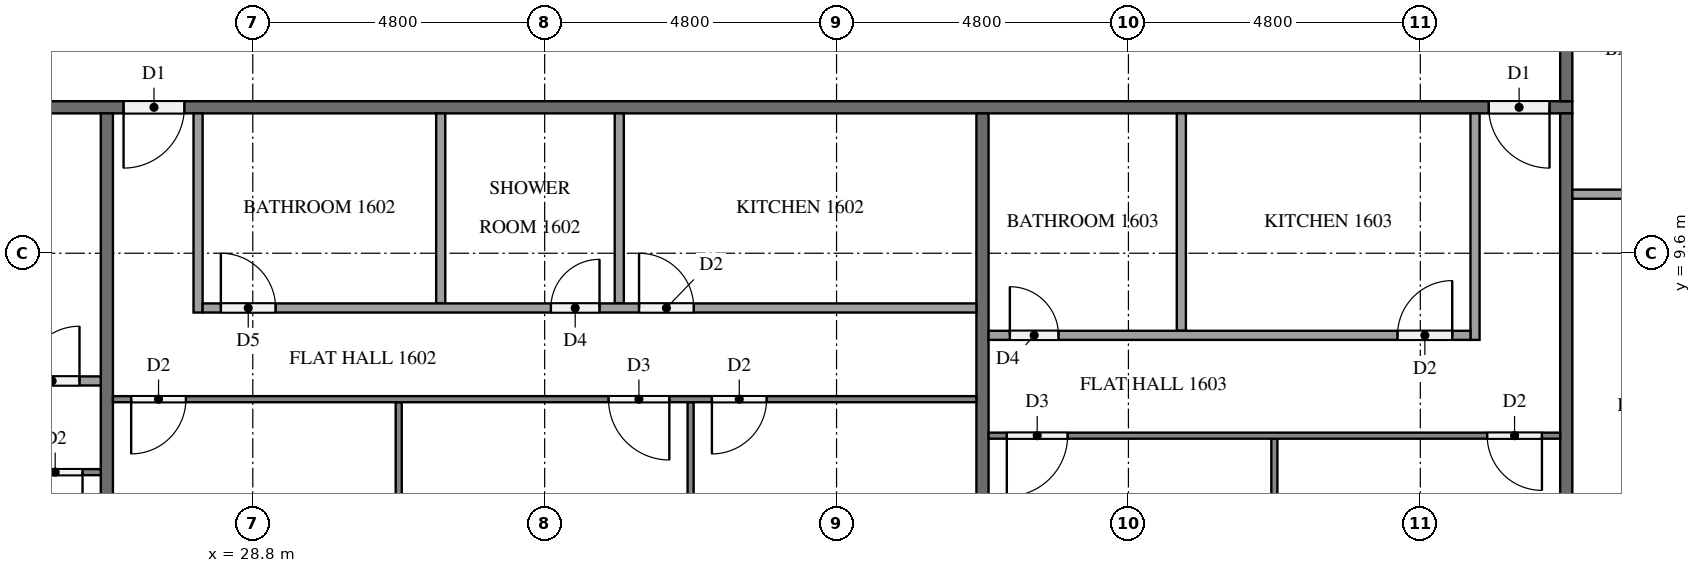
"""IFC4 building model, lengths in metres.
Left out: names, types, materials, properties, quantities, classifications, styles, units other than length and angle.
Written with IfcOpenShell. Run it as: python <this file> out.ifc"""

import sys

from ifc_helpers import new_model, si_unit, direction, frame, frame_2d, origin, place, context, subcontext, project, spatial, rectangle, extrude, element, fill, save


model = new_model("IFC4")
c1 = context("Model", 3, precision=1e-05, world=origin(), true_north=direction((0.0, 1.0)))
c2 = subcontext(c1, "Body", "Model", "MODEL_VIEW")
j1 = project(units=[si_unit("LENGTHUNIT", "METRE"), si_unit("PLANEANGLEUNIT", "RADIAN")], contexts=[c1])
p1 = place(None, origin())
s1 = spatial("IfcSite", under=j1, at=p1, CompositionType="ELEMENT")
p2 = place(p1, origin())
s2 = spatial("IfcBuilding", under=s1, at=p2, CompositionType="ELEMENT")
p3 = place(p2, frame((0.0, 0.0, 66.3)))
s3 = spatial("IfcBuildingStorey", under=s2, at=p3, CompositionType="ELEMENT", Elevation=66.3)
p4 = place(p3, frame((50.5, 12.0, 0.0), z_axis=(0.0, 0.0, 1.0), x_axis=(-1.0, 0.0, 0.0)))
e1 = element("IfcWall", 1, at=p4, inside=s3, PredefinedType="PARTITIONING", context=c2, shape_type="SweptSolid", body=[
    extrude(rectangle(XDim=38.6, YDim=0.2, at=frame_2d((19.3, 0.0))), origin(), (0.0, 0.0, 1.0), 3.2),
])
p5 = place(p4, frame((37.225, 0.0, 0.0)))
e2 = element("IfcOpeningElement", 2, at=p5, cuts=e1, PredefinedType="OPENING", context=c2, shape_type="SweptSolid", body=[
    extrude(rectangle(XDim=1.0, YDim=2.1, at=frame_2d((0.5, 1.05))), frame((0.0, 0.11, 0.0), z_axis=(0.0, -1.0, 0.0), x_axis=(1.0, 0.0, 0.0)), (0.0, 0.0, 1.0), 0.22),
])
p6 = place(p4, frame((22.825, 0.0, 0.0)))
e3 = element("IfcOpeningElement", 3, at=p6, cuts=e1, PredefinedType="OPENING", context=c2, shape_type="SweptSolid", body=[
    extrude(rectangle(XDim=1.0, YDim=2.1, at=frame_2d((0.5, 1.05))), frame((0.0, 0.11, 0.0), z_axis=(0.0, -1.0, 0.0), x_axis=(1.0, 0.0, 0.0)), (0.0, 0.0, 1.0), 0.22),
])
p7 = place(p4, frame((0.375, 0.0, 0.0)))
e4 = element("IfcOpeningElement", 4, at=p7, cuts=e1, PredefinedType="OPENING", context=c2, shape_type="SweptSolid", body=[
    extrude(rectangle(XDim=1.0, YDim=2.1, at=frame_2d((0.5, 1.05))), frame((0.0, 0.11, 0.0), z_axis=(0.0, -1.0, 0.0), x_axis=(1.0, 0.0, 0.0)), (0.0, 0.0, 1.0), 0.22),
])
p8 = place(p3, frame((50.4, 40.7, 0.0), z_axis=(0.0, 0.0, 1.0), x_axis=(0.0, -1.0, 0.0)))
e5 = element("IfcWall", 5, at=p8, inside=s3, PredefinedType="PARTITIONING", context=c2, shape_type="SweptSolid", body=[
    extrude(rectangle(XDim=28.6, YDim=0.2, at=frame_2d((14.3, 0.0))), origin(), (0.0, 0.0, 1.0), 3.2),
])
p9 = place(p8, frame((24.175, 0.0, 0.0)))
e6 = element("IfcOpeningElement", 6, at=p9, cuts=e5, PredefinedType="OPENING", context=c2, shape_type="SweptSolid", body=[
    extrude(rectangle(XDim=1.0, YDim=2.1, at=frame_2d((0.5, 1.05))), frame((0.0, 0.11, 0.0), z_axis=(0.0, -1.0, 0.0), x_axis=(1.0, 0.0, 0.0)), (0.0, 0.0, 1.0), 0.22),
])
p10 = place(p8, frame((22.625, 0.0, 0.0)))
e7 = element("IfcOpeningElement", 7, at=p10, cuts=e5, PredefinedType="OPENING", context=c2, shape_type="SweptSolid", body=[
    extrude(rectangle(XDim=1.0, YDim=2.1, at=frame_2d((0.5, 1.05))), frame((0.0, 0.11, 0.0), z_axis=(0.0, -1.0, 0.0), x_axis=(1.0, 0.0, 0.0)), (0.0, 0.0, 1.0), 0.22),
])
p11 = place(p8, frame((10.625, 0.0, 0.0)))
e8 = element("IfcOpeningElement", 8, at=p11, cuts=e5, PredefinedType="OPENING", context=c2, shape_type="SweptSolid", body=[
    extrude(rectangle(XDim=1.0, YDim=2.1, at=frame_2d((0.5, 1.05))), frame((0.0, 0.11, 0.0), z_axis=(0.0, -1.0, 0.0), x_axis=(1.0, 0.0, 0.0)), (0.0, 0.0, 1.0), 0.22),
])
for number, where, z_axis, x_axis in (
    (9, (26.4, 11.9, 0.0), (0.0, 0.0, 1.0), (0.0, -1.0, 0.0)),
    (10, (40.8, 11.9, 0.0), (0.0, 0.0, 1.0), (0.0, -1.0, 0.0)),
    (11, (50.4, 11.9, 0.0), (0.0, 0.0, 1.0), (0.0, -1.0, 0.0)),
):
    element("IfcWall", number, at=place(p3, frame(where, z_axis=z_axis, x_axis=x_axis)), inside=s3, PredefinedType="PARTITIONING", context=c2, shape_type="SweptSolid", body=[
        extrude(rectangle(XDim=11.8, YDim=0.2, at=frame_2d((5.9, 0.0))), origin(), (0.0, 0.0, 1.0), 3.2),
    ])
p12 = place(p3, frame((26.3, 6.0, 0.0), z_axis=(0.0, 0.0, 1.0), x_axis=(-1.0, 0.0, 0.0)))
e12 = element("IfcWall", 12, at=p12, inside=s3, PredefinedType="PARTITIONING", context=c2, shape_type="SweptSolid", body=[
    extrude(rectangle(XDim=14.2, YDim=0.1, at=frame_2d((7.1, 0.0))), origin(), (0.0, 0.0, 1.0), 3.2),
])
p13 = place(p12, frame((9.85, 0.0, 0.0)))
e13 = element("IfcOpeningElement", 13, at=p13, cuts=e12, PredefinedType="OPENING", context=c2, shape_type="SweptSolid", body=[
    extrude(rectangle(XDim=0.9, YDim=2.1, at=frame_2d((0.45, 1.05))), frame((0.0, 0.06, 0.0), z_axis=(0.0, -1.0, 0.0), x_axis=(1.0, 0.0, 0.0)), (0.0, 0.0, 1.0), 0.12),
])
p14 = place(p12, frame((8.15, 0.0, 0.0)))
e14 = element("IfcOpeningElement", 14, at=p14, cuts=e12, PredefinedType="OPENING", context=c2, shape_type="SweptSolid", body=[
    extrude(rectangle(XDim=1.0, YDim=2.1, at=frame_2d((0.5, 1.05))), frame((0.0, 0.06, 0.0), z_axis=(0.0, -1.0, 0.0), x_axis=(1.0, 0.0, 0.0)), (0.0, 0.0, 1.0), 0.12),
])
p15 = place(p12, frame((0.3, 0.0, 0.0)))
e15 = element("IfcOpeningElement", 15, at=p15, cuts=e12, PredefinedType="OPENING", context=c2, shape_type="SweptSolid", body=[
    extrude(rectangle(XDim=0.9, YDim=2.1, at=frame_2d((0.45, 1.05))), frame((0.0, 0.06, 0.0), z_axis=(0.0, -1.0, 0.0), x_axis=(1.0, 0.0, 0.0)), (0.0, 0.0, 1.0), 0.12),
])
p16 = place(p3, frame((13.575, 7.5, 0.0), z_axis=(0.0, 0.0, 1.0), x_axis=(1.0, 0.0, 0.0)))
e16 = element("IfcWall", 16, at=p16, inside=s3, PredefinedType="PARTITIONING", context=c2, shape_type="SweptSolid", body=[
    extrude(rectangle(XDim=12.725, YDim=0.15, at=frame_2d((6.363, 0.0))), origin(), (0.0, 0.0, 1.0), 3.2),
])
p17 = place(p16, frame((2.69, 0.0, 0.0)))
e17 = element("IfcOpeningElement", 17, at=p17, cuts=e16, PredefinedType="OPENING", context=c2, shape_type="SweptSolid", body=[
    extrude(rectangle(XDim=0.9, YDim=2.1, at=frame_2d((0.45, 1.05))), frame((0.0, 0.085, 0.0), z_axis=(0.0, -1.0, 0.0), x_axis=(1.0, 0.0, 0.0)), (0.0, 0.0, 1.0), 0.17),
])
p18 = place(p16, frame((4.24, 0.0, 0.0)))
e18 = element("IfcOpeningElement", 18, at=p18, cuts=e16, PredefinedType="OPENING", context=c2, shape_type="SweptSolid", body=[
    extrude(rectangle(XDim=0.8, YDim=2.1, at=frame_2d((0.4, 1.05))), frame((0.0, 0.085, 0.0), z_axis=(0.0, -1.0, 0.0), x_axis=(1.0, 0.0, 0.0)), (0.0, 0.0, 1.0), 0.17),
])
p19 = place(p16, frame((11.475, 0.0, 0.0)))
e19 = element("IfcOpeningElement", 19, at=p19, cuts=e16, PredefinedType="OPENING", context=c2, shape_type="SweptSolid", body=[
    extrude(rectangle(XDim=0.9, YDim=2.1, at=frame_2d((0.45, 1.05))), frame((0.0, 0.085, 0.0), z_axis=(0.0, -1.0, 0.0), x_axis=(1.0, 0.0, 0.0)), (0.0, 0.0, 1.0), 0.17),
])
for number, where, z_axis, x_axis in (
    (20, (31.2, 7.15, 0.0), (0.0, 0.0, 1.0), (0.0, -1.0, 0.0)),
    (21, (36.0, 7.15, 0.0), (0.0, 0.0, 1.0), (0.0, -1.0, 0.0)),
):
    element("IfcWall", number, at=place(p3, frame(where, z_axis=z_axis, x_axis=x_axis)), inside=s3, PredefinedType="PARTITIONING", context=c2, shape_type="SweptSolid", body=[
        extrude(rectangle(XDim=7.05, YDim=0.1, at=frame_2d((3.525, 0.0))), origin(), (0.0, 0.0, 1.0), 3.2),
    ])
p20 = place(p3, frame((40.7, 7.2, 0.0), z_axis=(0.0, 0.0, 1.0), x_axis=(-1.0, 0.0, 0.0)))
e22 = element("IfcWall", 22, at=p20, inside=s3, PredefinedType="PARTITIONING", context=c2, shape_type="SweptSolid", body=[
    extrude(rectangle(XDim=14.2, YDim=0.1, at=frame_2d((7.1, 0.0))), origin(), (0.0, 0.0, 1.0), 3.2),
])
p21 = place(p20, frame((13.0, 0.0, 0.0)))
e23 = element("IfcOpeningElement", 23, at=p21, cuts=e22, PredefinedType="OPENING", context=c2, shape_type="SweptSolid", body=[
    extrude(rectangle(XDim=0.9, YDim=2.1, at=frame_2d((0.45, 1.05))), frame((0.0, 0.06, 0.0), z_axis=(0.0, -1.0, 0.0), x_axis=(1.0, 0.0, 0.0)), (0.0, 0.0, 1.0), 0.12),
])
p22 = place(p20, frame((5.05, 0.0, 0.0)))
e24 = element("IfcOpeningElement", 24, at=p22, cuts=e22, PredefinedType="OPENING", context=c2, shape_type="SweptSolid", body=[
    extrude(rectangle(XDim=1.0, YDim=2.1, at=frame_2d((0.5, 1.05))), frame((0.0, 0.06, 0.0), z_axis=(0.0, -1.0, 0.0), x_axis=(1.0, 0.0, 0.0)), (0.0, 0.0, 1.0), 0.12),
])
p23 = place(p20, frame((3.45, 0.0, 0.0)))
e25 = element("IfcOpeningElement", 25, at=p23, cuts=e22, PredefinedType="OPENING", context=c2, shape_type="SweptSolid", body=[
    extrude(rectangle(XDim=0.9, YDim=2.1, at=frame_2d((0.45, 1.05))), frame((0.0, 0.06, 0.0), z_axis=(0.0, -1.0, 0.0), x_axis=(1.0, 0.0, 0.0)), (0.0, 0.0, 1.0), 0.12),
])
for number, where, z_axis, x_axis in (
    (26, (31.89, 11.9, 0.0), (0.0, 0.0, 1.0), (0.0, -1.0, 0.0)),
    (27, (34.827, 11.9, 0.0), (0.0, 0.0, 1.0), (0.0, -1.0, 0.0)),
):
    element("IfcWall", number, at=place(p3, frame(where, z_axis=z_axis, x_axis=x_axis)), inside=s3, PredefinedType="PARTITIONING", context=c2, shape_type="SweptSolid", body=[
        extrude(rectangle(XDim=3.125, YDim=0.15, at=frame_2d((1.562, 0.0))), origin(), (0.0, 0.0, 1.0), 3.2),
    ])
p24 = place(p3, frame((27.9, 11.9, 0.0), z_axis=(0.0, 0.0, 1.0), x_axis=(0.0, -1.0, 0.0)))
e28 = element("IfcWall", 28, at=p24, inside=s3, PredefinedType="PARTITIONING", context=c2, shape_type="SweptSolid", body=[
    extrude(rectangle(XDim=3.275, YDim=0.15, at=frame_2d((1.637, 0.0))), origin(), (0.0, 0.0, 1.0), 3.2),
])
p25 = place(p3, frame((27.975, 8.7, 0.0), z_axis=(0.0, 0.0, 1.0), x_axis=(1.0, 0.0, 0.0)))
e29 = element("IfcWall", 29, at=p25, inside=s3, PredefinedType="PARTITIONING", context=c2, shape_type="SweptSolid", body=[
    extrude(rectangle(XDim=12.725, YDim=0.15, at=frame_2d((6.362, 0.0))), origin(), (0.0, 0.0, 1.0), 3.2),
])
p26 = place(p25, frame((0.3, 0.0, 0.0)))
e30 = element("IfcOpeningElement", 30, at=p26, cuts=e29, PredefinedType="OPENING", context=c2, shape_type="SweptSolid", body=[
    extrude(rectangle(XDim=0.9, YDim=2.1, at=frame_2d((0.45, 1.05))), frame((0.0, 0.085, 0.0), z_axis=(0.0, -1.0, 0.0), x_axis=(1.0, 0.0, 0.0)), (0.0, 0.0, 1.0), 0.17),
])
p27 = place(p25, frame((5.727, 0.0, 0.0)))
e31 = element("IfcOpeningElement", 31, at=p27, cuts=e29, PredefinedType="OPENING", context=c2, shape_type="SweptSolid", body=[
    extrude(rectangle(XDim=0.8, YDim=2.1, at=frame_2d((0.4, 1.05))), frame((0.0, 0.085, 0.0), z_axis=(0.0, -1.0, 0.0), x_axis=(1.0, 0.0, 0.0)), (0.0, 0.0, 1.0), 0.17),
])
p28 = place(p25, frame((7.177, 0.0, 0.0)))
e32 = element("IfcOpeningElement", 32, at=p28, cuts=e29, PredefinedType="OPENING", context=c2, shape_type="SweptSolid", body=[
    extrude(rectangle(XDim=0.9, YDim=2.1, at=frame_2d((0.45, 1.05))), frame((0.0, 0.085, 0.0), z_axis=(0.0, -1.0, 0.0), x_axis=(1.0, 0.0, 0.0)), (0.0, 0.0, 1.0), 0.17),
])
p29 = place(p3, frame((45.6, 6.55, 0.0), z_axis=(0.0, 0.0, 1.0), x_axis=(0.0, -1.0, 0.0)))
e33 = element("IfcWall", 33, at=p29, inside=s3, PredefinedType="PARTITIONING", context=c2, shape_type="SweptSolid", body=[
    extrude(rectangle(XDim=6.45, YDim=0.1, at=frame_2d((3.225, 0.0))), origin(), (0.0, 0.0, 1.0), 3.2),
])
p30 = place(p3, frame((50.3, 6.6, 0.0), z_axis=(0.0, 0.0, 1.0), x_axis=(-1.0, 0.0, 0.0)))
e34 = element("IfcWall", 34, at=p30, inside=s3, PredefinedType="PARTITIONING", context=c2, shape_type="SweptSolid", body=[
    extrude(rectangle(XDim=9.4, YDim=0.1, at=frame_2d((4.7, 0.0))), origin(), (0.0, 0.0, 1.0), 3.2),
])
p31 = place(p30, frame((0.3, 0.0, 0.0)))
e35 = element("IfcOpeningElement", 35, at=p31, cuts=e34, PredefinedType="OPENING", context=c2, shape_type="SweptSolid", body=[
    extrude(rectangle(XDim=0.9, YDim=2.1, at=frame_2d((0.45, 1.05))), frame((0.0, 0.06, 0.0), z_axis=(0.0, -1.0, 0.0), x_axis=(1.0, 0.0, 0.0)), (0.0, 0.0, 1.0), 0.12),
])
p32 = place(p30, frame((8.1, 0.0, 0.0)))
e36 = element("IfcOpeningElement", 36, at=p32, cuts=e34, PredefinedType="OPENING", context=c2, shape_type="SweptSolid", body=[
    extrude(rectangle(XDim=1.0, YDim=2.1, at=frame_2d((0.5, 1.05))), frame((0.0, 0.06, 0.0), z_axis=(0.0, -1.0, 0.0), x_axis=(1.0, 0.0, 0.0)), (0.0, 0.0, 1.0), 0.12),
])
p33 = place(p3, frame((44.07, 11.9, 0.0), z_axis=(0.0, 0.0, 1.0), x_axis=(0.0, -1.0, 0.0)))
e37 = element("IfcWall", 37, at=p33, inside=s3, PredefinedType="PARTITIONING", context=c2, shape_type="SweptSolid", body=[
    extrude(rectangle(XDim=3.575, YDim=0.15, at=frame_2d((1.788, 0.0))), origin(), (0.0, 0.0, 1.0), 3.2),
])
p34 = place(p3, frame((48.9, 11.9, 0.0), z_axis=(0.0, 0.0, 1.0), x_axis=(0.0, -1.0, 0.0)))
e38 = element("IfcWall", 38, at=p34, inside=s3, PredefinedType="PARTITIONING", context=c2, shape_type="SweptSolid", body=[
    extrude(rectangle(XDim=3.725, YDim=0.15, at=frame_2d((1.862, 0.0))), origin(), (0.0, 0.0, 1.0), 3.2),
])
p35 = place(p3, frame((40.9, 8.25, 0.0), z_axis=(0.0, 0.0, 1.0), x_axis=(1.0, 0.0, 0.0)))
e39 = element("IfcWall", 39, at=p35, inside=s3, PredefinedType="PARTITIONING", context=c2, shape_type="SweptSolid", body=[
    extrude(rectangle(XDim=7.925, YDim=0.15, at=frame_2d((3.962, 0.0))), origin(), (0.0, 0.0, 1.0), 3.2),
])
p36 = place(p35, frame((6.725, 0.0, 0.0)))
e40 = element("IfcOpeningElement", 40, at=p36, cuts=e39, PredefinedType="OPENING", context=c2, shape_type="SweptSolid", body=[
    extrude(rectangle(XDim=0.9, YDim=2.1, at=frame_2d((0.45, 1.05))), frame((0.0, 0.085, 0.0), z_axis=(0.0, -1.0, 0.0), x_axis=(1.0, 0.0, 0.0)), (0.0, 0.0, 1.0), 0.17),
])
p37 = place(p35, frame((0.35, 0.0, 0.0)))
e41 = element("IfcOpeningElement", 41, at=p37, cuts=e39, PredefinedType="OPENING", context=c2, shape_type="SweptSolid", body=[
    extrude(rectangle(XDim=0.8, YDim=2.1, at=frame_2d((0.4, 1.05))), frame((0.0, 0.085, 0.0), z_axis=(0.0, -1.0, 0.0), x_axis=(1.0, 0.0, 0.0)), (0.0, 0.0, 1.0), 0.17),
])
p38 = place(p3, frame((50.5, 10.571, 0.0), z_axis=(0.0, 0.0, 1.0), x_axis=(1.0, 0.0, 0.0)))
e42 = element("IfcWall", 42, at=p38, inside=s3, PredefinedType="PARTITIONING", context=c2, shape_type="SweptSolid", body=[
    extrude(rectangle(XDim=3.575, YDim=0.15, at=frame_2d((1.788, 0.0))), origin(), (0.0, 0.0, 1.0), 3.2),
])
p39 = place(p6, origin())
e43 = element("IfcDoor", 43, at=p39, inside=s3, OperationType="SINGLE_SWING_RIGHT", PredefinedType="DOOR", context=c2, shape_type="SweptSolid", body=[
    extrude(rectangle(XDim=1.0, YDim=2.1, at=frame_2d((0.5, 1.05))), frame((0.0, 0.025, 0.0), z_axis=(0.0, -1.0, 0.0), x_axis=(1.0, 0.0, 0.0)), (0.0, 0.0, 1.0), 0.05),
])
fill(e3, e43)
p40 = place(p7, origin())
e44 = element("IfcDoor", 44, at=p40, inside=s3, OperationType="SINGLE_SWING_LEFT", PredefinedType="DOOR", context=c2, shape_type="SweptSolid", body=[
    extrude(rectangle(XDim=1.0, YDim=2.1, at=frame_2d((0.5, 1.05))), frame((0.0, 0.025, 0.0), z_axis=(0.0, -1.0, 0.0), x_axis=(1.0, 0.0, 0.0)), (0.0, 0.0, 1.0), 0.05),
])
fill(e4, e44)
p41 = place(p15, origin())
e45 = element("IfcDoor", 45, at=p41, inside=s3, OperationType="SINGLE_SWING_LEFT", PredefinedType="DOOR", context=c2, shape_type="SweptSolid", body=[
    extrude(rectangle(XDim=0.9, YDim=2.1, at=frame_2d((0.45, 1.05))), frame((0.0, 0.025, 0.0), z_axis=(0.0, -1.0, 0.0), x_axis=(1.0, 0.0, 0.0)), (0.0, 0.0, 1.0), 0.05),
])
fill(e15, e45)
p42 = place(p19, origin())
e46 = element("IfcDoor", 46, at=p42, inside=s3, OperationType="SINGLE_SWING_RIGHT", PredefinedType="DOOR", context=c2, shape_type="SweptSolid", body=[
    extrude(rectangle(XDim=0.9, YDim=2.1, at=frame_2d((0.45, 1.05))), frame((0.0, 0.025, 0.0), z_axis=(0.0, -1.0, 0.0), x_axis=(1.0, 0.0, 0.0)), (0.0, 0.0, 1.0), 0.05),
])
fill(e19, e46)
p43 = place(p21, origin())
e47 = element("IfcDoor", 47, at=p43, inside=s3, OperationType="SINGLE_SWING_RIGHT", PredefinedType="DOOR", context=c2, shape_type="SweptSolid", body=[
    extrude(rectangle(XDim=0.9, YDim=2.1, at=frame_2d((0.45, 1.05))), frame((0.0, 0.025, 0.0), z_axis=(0.0, -1.0, 0.0), x_axis=(1.0, 0.0, 0.0)), (0.0, 0.0, 1.0), 0.05),
])
fill(e23, e47)
p44 = place(p22, origin())
e48 = element("IfcDoor", 48, at=p44, inside=s3, OperationType="SINGLE_SWING_LEFT", PredefinedType="DOOR", context=c2, shape_type="SweptSolid", body=[
    extrude(rectangle(XDim=1.0, YDim=2.1, at=frame_2d((0.5, 1.05))), frame((0.0, 0.025, 0.0), z_axis=(0.0, -1.0, 0.0), x_axis=(1.0, 0.0, 0.0)), (0.0, 0.0, 1.0), 0.05),
])
fill(e24, e48)
p45 = place(p23, origin())
e49 = element("IfcDoor", 49, at=p45, inside=s3, OperationType="SINGLE_SWING_RIGHT", PredefinedType="DOOR", context=c2, shape_type="SweptSolid", body=[
    extrude(rectangle(XDim=0.9, YDim=2.1, at=frame_2d((0.45, 1.05))), frame((0.0, 0.025, 0.0), z_axis=(0.0, -1.0, 0.0), x_axis=(1.0, 0.0, 0.0)), (0.0, 0.0, 1.0), 0.05),
])
fill(e25, e49)
p46 = place(p26, origin())
e50 = element("IfcDoor", 50, at=p46, inside=s3, OperationType="SINGLE_SWING_LEFT", PredefinedType="DOOR", context=c2, shape_type="SweptSolid", body=[
    extrude(rectangle(XDim=0.9, YDim=2.1, at=frame_2d((0.45, 1.05))), frame((0.0, 0.025, 0.0), z_axis=(0.0, -1.0, 0.0), x_axis=(1.0, 0.0, 0.0)), (0.0, 0.0, 1.0), 0.05),
])
fill(e30, e50)
p47 = place(p27, origin())
e51 = element("IfcDoor", 51, at=p47, inside=s3, OperationType="SINGLE_SWING_RIGHT", PredefinedType="DOOR", context=c2, shape_type="SweptSolid", body=[
    extrude(rectangle(XDim=0.8, YDim=2.1, at=frame_2d((0.4, 1.05))), frame((0.0, 0.025, 0.0), z_axis=(0.0, -1.0, 0.0), x_axis=(1.0, 0.0, 0.0)), (0.0, 0.0, 1.0), 0.05),
])
fill(e31, e51)
p48 = place(p28, origin())
e52 = element("IfcDoor", 52, at=p48, inside=s3, OperationType="SINGLE_SWING_LEFT", PredefinedType="DOOR", context=c2, shape_type="SweptSolid", body=[
    extrude(rectangle(XDim=0.9, YDim=2.1, at=frame_2d((0.45, 1.05))), frame((0.0, 0.025, 0.0), z_axis=(0.0, -1.0, 0.0), x_axis=(1.0, 0.0, 0.0)), (0.0, 0.0, 1.0), 0.05),
])
fill(e32, e52)
p49 = place(p31, origin())
e53 = element("IfcDoor", 53, at=p49, inside=s3, OperationType="SINGLE_SWING_LEFT", PredefinedType="DOOR", context=c2, shape_type="SweptSolid", body=[
    extrude(rectangle(XDim=0.9, YDim=2.1, at=frame_2d((0.45, 1.05))), frame((0.0, 0.025, 0.0), z_axis=(0.0, -1.0, 0.0), x_axis=(1.0, 0.0, 0.0)), (0.0, 0.0, 1.0), 0.05),
])
fill(e35, e53)
p50 = place(p32, origin())
e54 = element("IfcDoor", 54, at=p50, inside=s3, OperationType="SINGLE_SWING_RIGHT", PredefinedType="DOOR", context=c2, shape_type="SweptSolid", body=[
    extrude(rectangle(XDim=1.0, YDim=2.1, at=frame_2d((0.5, 1.05))), frame((0.0, 0.025, 0.0), z_axis=(0.0, -1.0, 0.0), x_axis=(1.0, 0.0, 0.0)), (0.0, 0.0, 1.0), 0.05),
])
fill(e36, e54)
p51 = place(p36, origin())
e55 = element("IfcDoor", 55, at=p51, inside=s3, OperationType="SINGLE_SWING_RIGHT", PredefinedType="DOOR", context=c2, shape_type="SweptSolid", body=[
    extrude(rectangle(XDim=0.9, YDim=2.1, at=frame_2d((0.45, 1.05))), frame((0.0, 0.025, 0.0), z_axis=(0.0, -1.0, 0.0), x_axis=(1.0, 0.0, 0.0)), (0.0, 0.0, 1.0), 0.05),
])
fill(e40, e55)
p52 = place(p37, origin())
e56 = element("IfcDoor", 56, at=p52, inside=s3, OperationType="SINGLE_SWING_LEFT", PredefinedType="DOOR", context=c2, shape_type="SweptSolid", body=[
    extrude(rectangle(XDim=0.8, YDim=2.1, at=frame_2d((0.4, 1.05))), frame((0.0, 0.025, 0.0), z_axis=(0.0, -1.0, 0.0), x_axis=(1.0, 0.0, 0.0)), (0.0, 0.0, 1.0), 0.05),
])
fill(e41, e56)
save(model, sys.argv[1])
